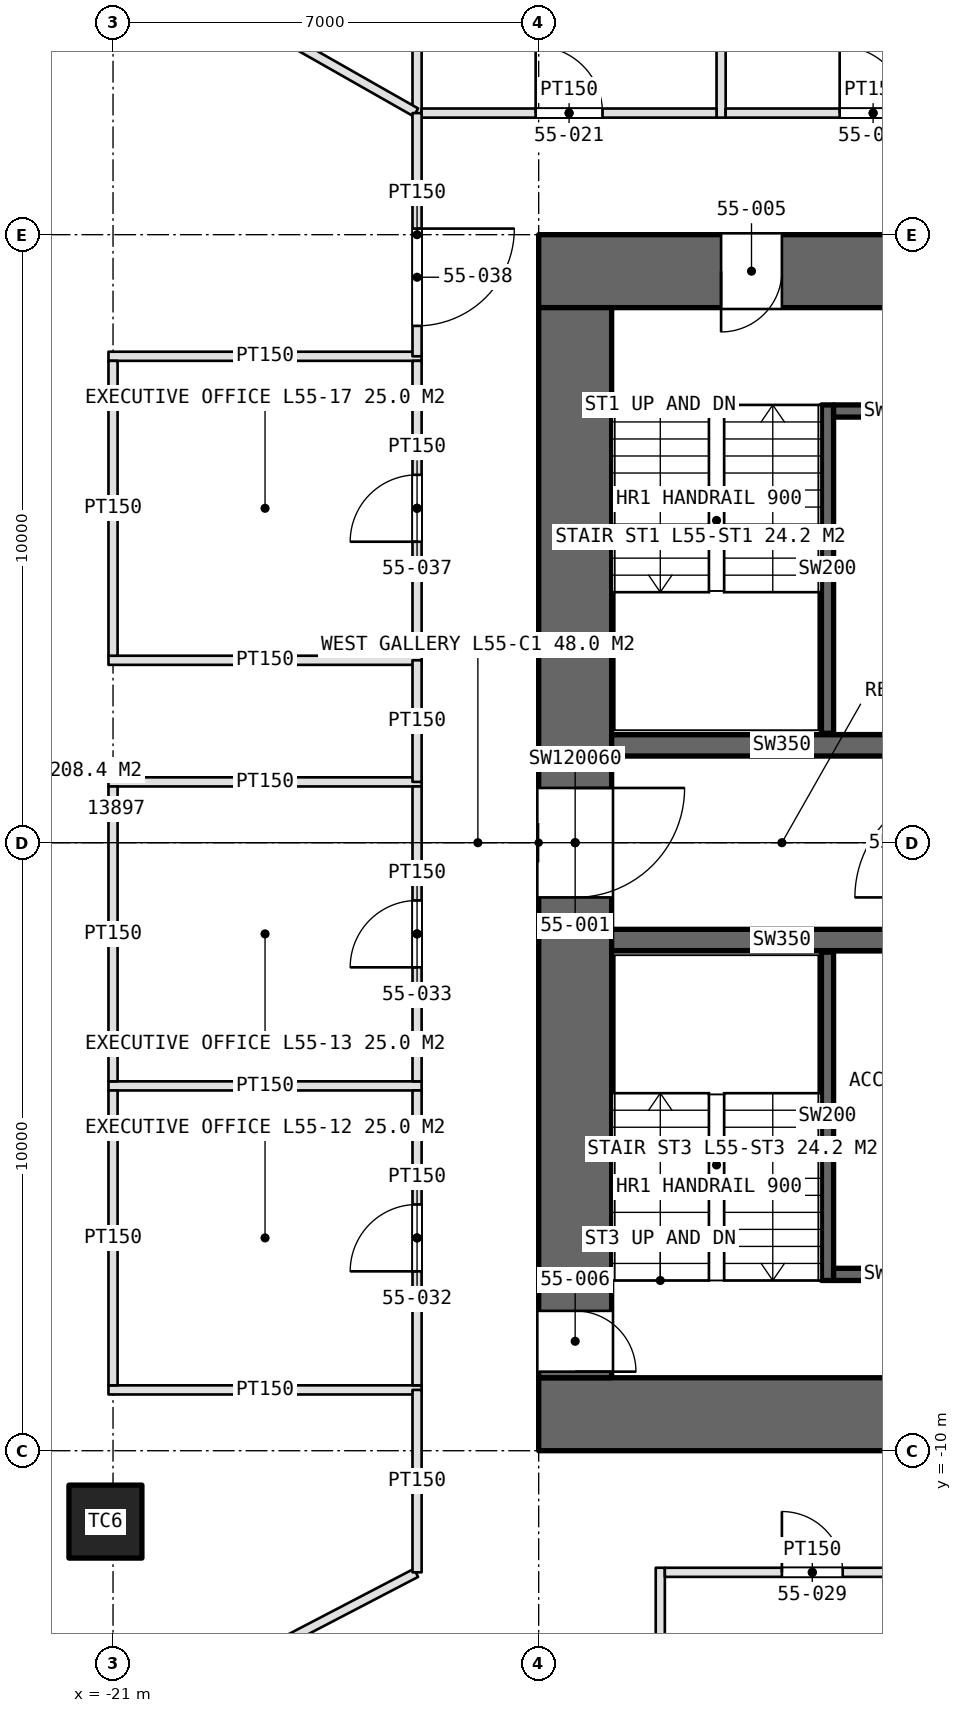
"""IFC4 building model, lengths in metres.
Left out: names, types, materials, properties, quantities, classifications, styles, units other than length and angle.
Written with IfcOpenShell. Run it as: python <this file> out.ifc"""

import sys

from ifc_helpers import new_model, si_unit, direction, frame, frame_2d, origin, origin_2d, place, context, subcontext, project, spatial, rectangle, extrude, element, fill, save


model = new_model("IFC4")
c1 = context("Model", 3, precision=1e-05, world=origin(), true_north=direction((0.0, 1.0)))
c2 = subcontext(c1, "Body", "Model", "MODEL_VIEW")
j1 = project(units=[si_unit("LENGTHUNIT", "METRE"), si_unit("PLANEANGLEUNIT", "RADIAN")], contexts=[c1])
p1 = place(None, origin())
s1 = spatial("IfcSite", under=j1, at=p1, CompositionType="ELEMENT")
p2 = place(p1, origin())
s2 = spatial("IfcBuilding", under=s1, at=p2, CompositionType="ELEMENT")
p3 = place(p2, frame((0.0, 0.0, 249.4)))
s3 = spatial("IfcBuildingStorey", under=s2, at=p3, CompositionType="ELEMENT", Elevation=249.4)
p4 = place(p3, frame((-14.0, -9.4, 0.0), z_axis=(0.0, 0.0, 1.0), x_axis=(1.0, 0.0, 0.0)))
e1 = element("IfcWall", 1, at=p4, inside=s3, PredefinedType="SHEAR", context=c2, shape_type="SweptSolid", body=[
    extrude(rectangle(XDim=28.0, YDim=1.2, at=frame_2d((14.0, 0.0))), origin(), (0.0, 0.0, 1.0), 4.2),
])
p5 = place(p4, frame((22.9, 0.0, 0.0)))
e2 = element("IfcOpeningElement", 2, at=p5, cuts=e1, PredefinedType="OPENING", context=c2, shape_type="SweptSolid", body=[
    extrude(rectangle(XDim=2.2, YDim=2.7, at=frame_2d((1.1, 1.35))), frame((0.0, 0.61, 0.0), z_axis=(0.0, -1.0, 0.0), x_axis=(1.0, 0.0, 0.0)), (0.0, 0.0, 1.0), 1.22),
])
p6 = place(p3, frame((14.0, 9.4, 0.0), z_axis=(0.0, 0.0, 1.0), x_axis=(-1.0, 0.0, 0.0)))
e3 = element("IfcWall", 3, at=p6, inside=s3, PredefinedType="SHEAR", context=c2, shape_type="SweptSolid", body=[
    extrude(rectangle(XDim=28.0, YDim=1.2, at=frame_2d((14.0, 0.0))), origin(), (0.0, 0.0, 1.0), 4.2),
])
p7 = place(p6, frame((24.0, 0.0, 0.0)))
e4 = element("IfcOpeningElement", 4, at=p7, cuts=e3, PredefinedType="OPENING", context=c2, shape_type="SweptSolid", body=[
    extrude(rectangle(XDim=1.0, YDim=2.4, at=frame_2d((0.5, 1.2))), frame((0.0, 0.61, 0.0), z_axis=(0.0, -1.0, 0.0), x_axis=(1.0, 0.0, 0.0)), (0.0, 0.0, 1.0), 1.22),
])
p8 = place(p3, frame((-13.4, 8.8, 0.0), z_axis=(0.0, 0.0, 1.0), x_axis=(0.0, -1.0, 0.0)))
e5 = element("IfcWall", 5, at=p8, inside=s3, PredefinedType="SHEAR", context=c2, shape_type="SweptSolid", body=[
    extrude(rectangle(XDim=17.6, YDim=1.2, at=frame_2d((8.8, 0.0))), origin(), (0.0, 0.0, 1.0), 4.2),
])
p9 = place(p8, frame((7.9, 0.0, 0.0)))
e6 = element("IfcOpeningElement", 6, at=p9, cuts=e5, PredefinedType="OPENING", context=c2, shape_type="SweptSolid", body=[
    extrude(rectangle(XDim=1.8, YDim=2.4, at=frame_2d((0.9, 1.2))), frame((0.0, 0.61, 0.0), z_axis=(0.0, -1.0, 0.0), x_axis=(1.0, 0.0, 0.0)), (0.0, 0.0, 1.0), 1.22),
])
p10 = place(p8, frame((16.5, 0.0, 0.0)))
e7 = element("IfcOpeningElement", 7, at=p10, cuts=e5, PredefinedType="OPENING", context=c2, shape_type="SweptSolid", body=[
    extrude(rectangle(XDim=1.0, YDim=2.4, at=frame_2d((0.5, 1.2))), frame((0.0, 0.61, 0.0), z_axis=(0.0, -1.0, 0.0), x_axis=(1.0, 0.0, 0.0)), (0.0, 0.0, 1.0), 1.22),
])
for number, where, z_axis, x_axis in (
    (8, (-12.8, 1.6, 0.0), (0.0, 0.0, 1.0), (1.0, 0.0, 0.0)),
    (9, (-12.8, -1.6, 0.0), (0.0, 0.0, 1.0), (1.0, 0.0, 0.0)),
):
    element("IfcWall", number, at=place(p3, frame(where, z_axis=z_axis, x_axis=x_axis)), inside=s3, PredefinedType="SHEAR", context=c2, shape_type="SweptSolid", body=[
        extrude(rectangle(XDim=5.6, YDim=0.35, at=frame_2d((2.8, 0.0))), origin(), (0.0, 0.0, 1.0), 4.2),
    ])
p11 = place(p3, frame((-21.125, -11.166, 0.0), z_axis=(0.0, 0.0, 1.0), x_axis=(1.0, 0.0, 0.0)))
e10 = element("IfcColumn", 10, at=p11, inside=s3, PredefinedType="COLUMN", context=c2, shape_type="SweptSolid", body=[
    extrude(rectangle(XDim=1.2, YDim=1.2, at=origin_2d()), origin(), (0.0, 0.0, 1.0), 4.2),
])
p12 = place(p3, frame((-9.25, 7.2, 0.0), z_axis=(0.0, 0.0, 1.0), x_axis=(0.0, -1.0, 0.0)))
e11 = element("IfcWall", 11, at=p12, inside=s3, PredefinedType="SOLIDWALL", context=c2, shape_type="SweptSolid", body=[
    extrude(rectangle(XDim=5.4, YDim=0.2, at=frame_2d((2.7, 0.0))), origin(), (0.0, 0.0, 1.0), 4.2),
])
p13 = place(p3, frame((-9.15, 7.1, 0.0), z_axis=(0.0, 0.0, 1.0), x_axis=(1.0, 0.0, 0.0)))
e12 = element("IfcWall", 12, at=p13, inside=s3, PredefinedType="SOLIDWALL", context=c2, shape_type="SweptSolid", body=[
    extrude(rectangle(XDim=1.95, YDim=0.2, at=frame_2d((0.975, 0.0))), origin(), (0.0, 0.0, 1.0), 4.2),
])
p14 = place(p3, frame((-9.25, -7.2, 0.0), z_axis=(0.0, 0.0, 1.0), x_axis=(0.0, 1.0, 0.0)))
e13 = element("IfcWall", 13, at=p14, inside=s3, PredefinedType="SOLIDWALL", context=c2, shape_type="SweptSolid", body=[
    extrude(rectangle(XDim=5.4, YDim=0.2, at=frame_2d((2.7, 0.0))), origin(), (0.0, 0.0, 1.0), 4.2),
])
p15 = place(p3, frame((-9.15, -7.1, 0.0), z_axis=(0.0, 0.0, 1.0), x_axis=(1.0, 0.0, 0.0)))
e14 = element("IfcWall", 14, at=p15, inside=s3, PredefinedType="SOLIDWALL", context=c2, shape_type="SweptSolid", body=[
    extrude(rectangle(XDim=1.95, YDim=0.2, at=frame_2d((0.975, 0.0))), origin(), (0.0, 0.0, 1.0), 4.2),
])
for number, where, z_axis, x_axis in (
    (15, (-16.0, 11.925, 0.0), (0.0, 0.0, 1.0), (0.0, 1.0, 0.0)),
    (16, (-11.0, 11.925, 0.0), (0.0, 0.0, 1.0), (0.0, 1.0, 0.0)),
):
    element("IfcWall", number, at=place(p3, frame(where, z_axis=z_axis, x_axis=x_axis)), inside=s3, PredefinedType="PARTITIONING", context=c2, shape_type="SweptSolid", body=[
        extrude(rectangle(XDim=5.15, YDim=0.15, at=frame_2d((2.575, 0.0))), origin(), (0.0, 0.0, 1.0), 3.0),
    ])
p16 = place(p3, frame((-15.925, 12.0, 0.0), z_axis=(0.0, 0.0, 1.0), x_axis=(1.0, 0.0, 0.0)))
e17 = element("IfcWall", 17, at=p16, inside=s3, PredefinedType="PARTITIONING", context=c2, shape_type="SweptSolid", body=[
    extrude(rectangle(XDim=4.85, YDim=0.15, at=frame_2d((2.425, 0.0))), origin(), (0.0, 0.0, 1.0), 3.0),
])
p17 = place(p16, frame((1.875, 0.0, 0.0)))
e18 = element("IfcOpeningElement", 18, at=p17, cuts=e17, PredefinedType="OPENING", context=c2, shape_type="SweptSolid", body=[
    extrude(rectangle(XDim=1.1, YDim=2.3, at=frame_2d((0.55, 1.15))), frame((0.0, 0.085, 0.0), z_axis=(0.0, -1.0, 0.0), x_axis=(1.0, 0.0, 0.0)), (0.0, 0.0, 1.0), 0.17),
])
p18 = place(p3, frame((-10.925, 12.0, 0.0), z_axis=(0.0, 0.0, 1.0), x_axis=(1.0, 0.0, 0.0)))
e19 = element("IfcWall", 19, at=p18, inside=s3, PredefinedType="PARTITIONING", context=c2, shape_type="SweptSolid", body=[
    extrude(rectangle(XDim=4.85, YDim=0.15, at=frame_2d((2.425, 0.0))), origin(), (0.0, 0.0, 1.0), 3.0),
])
p19 = place(p18, frame((1.875, 0.0, 0.0)))
e20 = element("IfcOpeningElement", 20, at=p19, cuts=e19, PredefinedType="OPENING", context=c2, shape_type="SweptSolid", body=[
    extrude(rectangle(XDim=1.1, YDim=2.3, at=frame_2d((0.55, 1.15))), frame((0.0, 0.085, 0.0), z_axis=(0.0, -1.0, 0.0), x_axis=(1.0, 0.0, 0.0)), (0.0, 0.0, 1.0), 0.17),
])
p20 = place(p3, frame((-12.0, -11.925, 0.0), z_axis=(0.0, 0.0, 1.0), x_axis=(0.0, -1.0, 0.0)))
e21 = element("IfcWall", 21, at=p20, inside=s3, PredefinedType="PARTITIONING", context=c2, shape_type="SweptSolid", body=[
    extrude(rectangle(XDim=5.15, YDim=0.15, at=frame_2d((2.575, 0.0))), origin(), (0.0, 0.0, 1.0), 3.0),
])
p21 = place(p3, frame((-11.925, -12.0, 0.0), z_axis=(0.0, 0.0, 1.0), x_axis=(1.0, 0.0, 0.0)))
e22 = element("IfcWall", 22, at=p21, inside=s3, PredefinedType="PARTITIONING", context=c2, shape_type="SweptSolid", body=[
    extrude(rectangle(XDim=4.85, YDim=0.15, at=frame_2d((2.425, 0.0))), origin(), (0.0, 0.0, 1.0), 3.0),
])
p22 = place(p21, frame((1.925, 0.0, 0.0)))
e23 = element("IfcOpeningElement", 23, at=p22, cuts=e22, PredefinedType="OPENING", context=c2, shape_type="SweptSolid", body=[
    extrude(rectangle(XDim=1.0, YDim=2.2, at=frame_2d((0.5, 1.1))), frame((0.0, 0.085, 0.0), z_axis=(0.0, -1.0, 0.0), x_axis=(1.0, 0.0, 0.0)), (0.0, 0.0, 1.0), 0.17),
])
for number, where, z_axis, x_axis in (
    (24, (-15.925, -9.0, 0.0), (0.0, 0.0, 1.0), (-1.0, 0.0, 0.0)),
    (25, (-15.925, -4.0, 0.0), (0.0, 0.0, 1.0), (-1.0, 0.0, 0.0)),
    (26, (-15.925, 1.0, 0.0), (0.0, 0.0, 1.0), (-1.0, 0.0, 0.0)),
):
    element("IfcWall", number, at=place(p3, frame(where, z_axis=z_axis, x_axis=x_axis)), inside=s3, PredefinedType="PARTITIONING", context=c2, shape_type="SweptSolid", body=[
        extrude(rectangle(XDim=5.15, YDim=0.15, at=frame_2d((2.575, 0.0))), origin(), (0.0, 0.0, 1.0), 3.0),
    ])
p23 = place(p3, frame((-16.0, -8.925, 0.0), z_axis=(0.0, 0.0, 1.0), x_axis=(0.0, 1.0, 0.0)))
e27 = element("IfcWall", 27, at=p23, inside=s3, PredefinedType="PARTITIONING", context=c2, shape_type="SweptSolid", body=[
    extrude(rectangle(XDim=4.85, YDim=0.15, at=frame_2d((2.425, 0.0))), origin(), (0.0, 0.0, 1.0), 3.0),
])
p24 = place(p23, frame((1.875, 0.0, 0.0)))
e28 = element("IfcOpeningElement", 28, at=p24, cuts=e27, PredefinedType="OPENING", context=c2, shape_type="SweptSolid", body=[
    extrude(rectangle(XDim=1.1, YDim=2.3, at=frame_2d((0.55, 1.15))), frame((0.0, 0.085, 0.0), z_axis=(0.0, -1.0, 0.0), x_axis=(1.0, 0.0, 0.0)), (0.0, 0.0, 1.0), 0.17),
])
p25 = place(p3, frame((-21.0, -8.925, 0.0), z_axis=(0.0, 0.0, 1.0), x_axis=(0.0, 1.0, 0.0)))
e29 = element("IfcWall", 29, at=p25, inside=s3, PredefinedType="PARTITIONING", context=c2, shape_type="SweptSolid", body=[
    extrude(rectangle(XDim=4.85, YDim=0.15, at=frame_2d((2.425, 0.0))), origin(), (0.0, 0.0, 1.0), 3.0),
])
p26 = place(p3, frame((-16.0, -3.925, 0.0), z_axis=(0.0, 0.0, 1.0), x_axis=(0.0, 1.0, 0.0)))
e30 = element("IfcWall", 30, at=p26, inside=s3, PredefinedType="PARTITIONING", context=c2, shape_type="SweptSolid", body=[
    extrude(rectangle(XDim=4.85, YDim=0.15, at=frame_2d((2.425, 0.0))), origin(), (0.0, 0.0, 1.0), 3.0),
])
p27 = place(p26, frame((1.875, 0.0, 0.0)))
e31 = element("IfcOpeningElement", 31, at=p27, cuts=e30, PredefinedType="OPENING", context=c2, shape_type="SweptSolid", body=[
    extrude(rectangle(XDim=1.1, YDim=2.3, at=frame_2d((0.55, 1.15))), frame((0.0, 0.085, 0.0), z_axis=(0.0, -1.0, 0.0), x_axis=(1.0, 0.0, 0.0)), (0.0, 0.0, 1.0), 0.17),
])
p28 = place(p3, frame((-21.0, -3.925, 0.0), z_axis=(0.0, 0.0, 1.0), x_axis=(0.0, 1.0, 0.0)))
e32 = element("IfcWall", 32, at=p28, inside=s3, PredefinedType="PARTITIONING", context=c2, shape_type="SweptSolid", body=[
    extrude(rectangle(XDim=4.85, YDim=0.15, at=frame_2d((2.425, 0.0))), origin(), (0.0, 0.0, 1.0), 3.0),
])
for number, where, z_axis, x_axis in (
    (33, (-15.925, 3.0, 0.0), (0.0, 0.0, 1.0), (-1.0, 0.0, 0.0)),
    (34, (-15.925, 8.0, 0.0), (0.0, 0.0, 1.0), (-1.0, 0.0, 0.0)),
):
    element("IfcWall", number, at=place(p3, frame(where, z_axis=z_axis, x_axis=x_axis)), inside=s3, PredefinedType="PARTITIONING", context=c2, shape_type="SweptSolid", body=[
        extrude(rectangle(XDim=5.15, YDim=0.15, at=frame_2d((2.575, 0.0))), origin(), (0.0, 0.0, 1.0), 3.0),
    ])
p29 = place(p3, frame((-16.0, 3.075, 0.0), z_axis=(0.0, 0.0, 1.0), x_axis=(0.0, 1.0, 0.0)))
e35 = element("IfcWall", 35, at=p29, inside=s3, PredefinedType="PARTITIONING", context=c2, shape_type="SweptSolid", body=[
    extrude(rectangle(XDim=4.85, YDim=0.15, at=frame_2d((2.425, 0.0))), origin(), (0.0, 0.0, 1.0), 3.0),
])
p30 = place(p29, frame((1.875, 0.0, 0.0)))
e36 = element("IfcOpeningElement", 36, at=p30, cuts=e35, PredefinedType="OPENING", context=c2, shape_type="SweptSolid", body=[
    extrude(rectangle(XDim=1.1, YDim=2.3, at=frame_2d((0.55, 1.15))), frame((0.0, 0.085, 0.0), z_axis=(0.0, -1.0, 0.0), x_axis=(1.0, 0.0, 0.0)), (0.0, 0.0, 1.0), 0.17),
])
p31 = place(p3, frame((-21.0, 3.075, 0.0), z_axis=(0.0, 0.0, 1.0), x_axis=(0.0, 1.0, 0.0)))
e37 = element("IfcWall", 37, at=p31, inside=s3, PredefinedType="PARTITIONING", context=c2, shape_type="SweptSolid", body=[
    extrude(rectangle(XDim=4.85, YDim=0.15, at=frame_2d((2.425, 0.0))), origin(), (0.0, 0.0, 1.0), 3.0),
])
p32 = place(p3, frame((-16.018, -12.009, 0.0), z_axis=(0.0, 0.0, 1.0), x_axis=(-0.886831549241, -0.462092851351, 0.0)))
e38 = element("IfcWall", 38, at=p32, inside=s3, PredefinedType="PARTITIONING", context=c2, shape_type="SweptSolid", body=[
    extrude(rectangle(XDim=5.555, YDim=0.15, at=frame_2d((2.778, 0.0))), origin(), (0.0, 0.0, 1.0), 3.0),
])
p33 = place(p3, frame((-16.02, 12.011, 0.0), z_axis=(0.0, 0.0, 1.0), x_axis=(-0.869354026591, 0.494189818238, 0.0)))
e39 = element("IfcWall", 39, at=p33, inside=s3, PredefinedType="PARTITIONING", context=c2, shape_type="SweptSolid", body=[
    extrude(rectangle(XDim=7.788, YDim=0.15, at=frame_2d((3.894, 0.0))), origin(), (0.0, 0.0, 1.0), 3.0),
])
p34 = place(p3, frame((-16.0, -9.0, 0.0), z_axis=(0.0, 0.0, 1.0), x_axis=(0.0, -1.0, 0.0)))
e40 = element("IfcWall", 40, at=p34, inside=s3, PredefinedType="PARTITIONING", context=c2, shape_type="SweptSolid", body=[
    extrude(rectangle(XDim=3.0, YDim=0.15, at=frame_2d((1.5, 0.0))), origin(), (0.0, 0.0, 1.0), 3.0),
])
p35 = place(p3, frame((-16.0, 3.0, 0.0), z_axis=(0.0, 0.0, 1.0), x_axis=(0.0, -1.0, 0.0)))
e41 = element("IfcWall", 41, at=p35, inside=s3, PredefinedType="PARTITIONING", context=c2, shape_type="SweptSolid", body=[
    extrude(rectangle(XDim=2.0, YDim=0.15, at=frame_2d((1.0, 0.0))), origin(), (0.0, 0.0, 1.0), 3.0),
])
p36 = place(p3, frame((-16.0, 12.0, 0.0), z_axis=(0.0, 0.0, 1.0), x_axis=(0.0, -1.0, 0.0)))
e42 = element("IfcWall", 42, at=p36, inside=s3, PredefinedType="PARTITIONING", context=c2, shape_type="SweptSolid", body=[
    extrude(rectangle(XDim=4.0, YDim=0.15, at=frame_2d((2.0, 0.0))), origin(), (0.0, 0.0, 1.0), 3.0),
])
p37 = place(p36, frame((1.9, 0.0, 0.0)))
e43 = element("IfcOpeningElement", 43, at=p37, cuts=e42, PredefinedType="OPENING", context=c2, shape_type="SweptSolid", body=[
    extrude(rectangle(XDim=1.6, YDim=2.4, at=frame_2d((0.8, 1.2))), frame((0.0, 0.085, 0.0), z_axis=(0.0, -1.0, 0.0), x_axis=(1.0, 0.0, 0.0)), (0.0, 0.0, 1.0), 0.17),
])
p38 = place(p9, origin())
e44 = element("IfcDoor", 44, at=p38, inside=s3, OperationType="DOUBLE_DOOR_SINGLE_SWING", PredefinedType="DOOR", context=c2, shape_type="SweptSolid", body=[
    extrude(rectangle(XDim=1.8, YDim=2.4, at=frame_2d((0.9, 1.2))), frame((0.0, 0.025, 0.0), z_axis=(0.0, -1.0, 0.0), x_axis=(1.0, 0.0, 0.0)), (0.0, 0.0, 1.0), 0.05),
])
fill(e6, e44)
p39 = place(p7, origin())
e45 = element("IfcDoor", 45, at=p39, inside=s3, OperationType="SINGLE_SWING_RIGHT", PredefinedType="DOOR", context=c2, shape_type="SweptSolid", body=[
    extrude(rectangle(XDim=1.0, YDim=2.4, at=frame_2d((0.5, 1.2))), frame((0.0, 0.025, 0.0), z_axis=(0.0, -1.0, 0.0), x_axis=(1.0, 0.0, 0.0)), (0.0, 0.0, 1.0), 0.05),
])
fill(e4, e45)
p40 = place(p10, origin())
e46 = element("IfcDoor", 46, at=p40, inside=s3, OperationType="SINGLE_SWING_RIGHT", PredefinedType="DOOR", context=c2, shape_type="SweptSolid", body=[
    extrude(rectangle(XDim=1.0, YDim=2.4, at=frame_2d((0.5, 1.2))), frame((0.0, 0.025, 0.0), z_axis=(0.0, -1.0, 0.0), x_axis=(1.0, 0.0, 0.0)), (0.0, 0.0, 1.0), 0.05),
])
fill(e7, e46)
p41 = place(p17, origin())
e47 = element("IfcDoor", 47, at=p41, inside=s3, OperationType="SINGLE_SWING_LEFT", PredefinedType="DOOR", context=c2, shape_type="SweptSolid", body=[
    extrude(rectangle(XDim=1.1, YDim=2.3, at=frame_2d((0.55, 1.15))), frame((0.0, 0.025, 0.0), z_axis=(0.0, -1.0, 0.0), x_axis=(1.0, 0.0, 0.0)), (0.0, 0.0, 1.0), 0.05),
])
fill(e18, e47)
p42 = place(p19, origin())
e48 = element("IfcDoor", 48, at=p42, inside=s3, OperationType="SINGLE_SWING_LEFT", PredefinedType="DOOR", context=c2, shape_type="SweptSolid", body=[
    extrude(rectangle(XDim=1.1, YDim=2.3, at=frame_2d((0.55, 1.15))), frame((0.0, 0.025, 0.0), z_axis=(0.0, -1.0, 0.0), x_axis=(1.0, 0.0, 0.0)), (0.0, 0.0, 1.0), 0.05),
])
fill(e20, e48)
p43 = place(p22, origin())
e49 = element("IfcDoor", 49, at=p43, inside=s3, OperationType="SINGLE_SWING_LEFT", PredefinedType="DOOR", context=c2, shape_type="SweptSolid", body=[
    extrude(rectangle(XDim=1.0, YDim=2.2, at=frame_2d((0.5, 1.1))), frame((0.0, 0.025, 0.0), z_axis=(0.0, -1.0, 0.0), x_axis=(1.0, 0.0, 0.0)), (0.0, 0.0, 1.0), 0.05),
])
fill(e23, e49)
p44 = place(p24, origin())
e50 = element("IfcDoor", 50, at=p44, inside=s3, OperationType="SINGLE_SWING_LEFT", PredefinedType="DOOR", context=c2, shape_type="SweptSolid", body=[
    extrude(rectangle(XDim=1.1, YDim=2.3, at=frame_2d((0.55, 1.15))), frame((0.0, 0.025, 0.0), z_axis=(0.0, -1.0, 0.0), x_axis=(1.0, 0.0, 0.0)), (0.0, 0.0, 1.0), 0.05),
])
fill(e28, e50)
p45 = place(p27, origin())
e51 = element("IfcDoor", 51, at=p45, inside=s3, OperationType="SINGLE_SWING_LEFT", PredefinedType="DOOR", context=c2, shape_type="SweptSolid", body=[
    extrude(rectangle(XDim=1.1, YDim=2.3, at=frame_2d((0.55, 1.15))), frame((0.0, 0.025, 0.0), z_axis=(0.0, -1.0, 0.0), x_axis=(1.0, 0.0, 0.0)), (0.0, 0.0, 1.0), 0.05),
])
fill(e31, e51)
p46 = place(p30, origin())
e52 = element("IfcDoor", 52, at=p46, inside=s3, OperationType="SINGLE_SWING_LEFT", PredefinedType="DOOR", context=c2, shape_type="SweptSolid", body=[
    extrude(rectangle(XDim=1.1, YDim=2.3, at=frame_2d((0.55, 1.15))), frame((0.0, 0.025, 0.0), z_axis=(0.0, -1.0, 0.0), x_axis=(1.0, 0.0, 0.0)), (0.0, 0.0, 1.0), 0.05),
])
fill(e36, e52)
p47 = place(p37, origin())
e53 = element("IfcDoor", 53, at=p47, inside=s3, OperationType="DOUBLE_DOOR_SINGLE_SWING", PredefinedType="DOOR", context=c2, shape_type="SweptSolid", body=[
    extrude(rectangle(XDim=1.6, YDim=2.4, at=frame_2d((0.8, 1.2))), frame((0.0, 0.025, 0.0), z_axis=(0.0, -1.0, 0.0), x_axis=(1.0, 0.0, 0.0)), (0.0, 0.0, 1.0), 0.05),
])
fill(e43, e53)
save(model, sys.argv[1])
